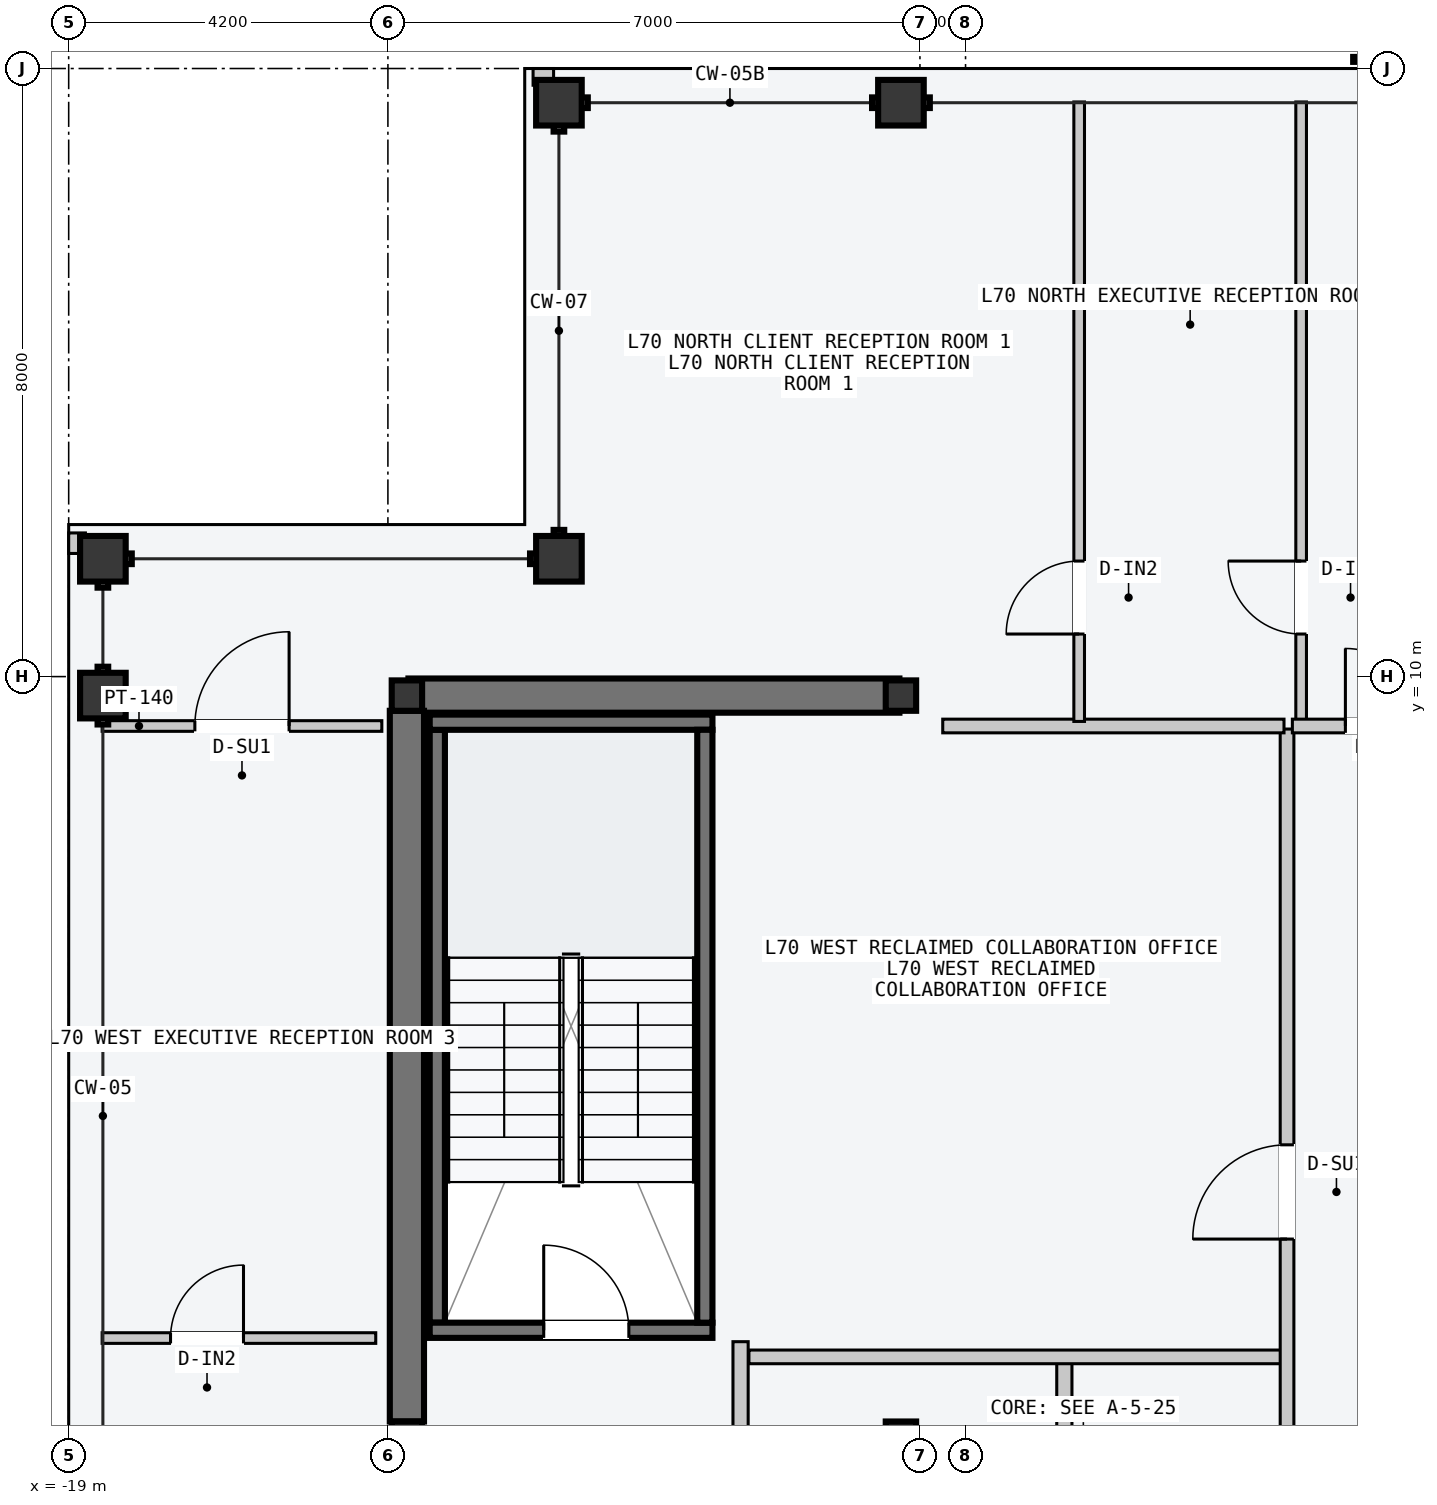
"""IFC4 building model, lengths in metres.
Left out: names, types, materials, properties, quantities, classifications, styles, units other than length and angle.
Written with IfcOpenShell. Run it as: python <this file> out.ifc"""

import sys

from ifc_helpers import new_model, si_unit, direction, frame, frame_2d, origin, origin_2d, place, context, subcontext, project, spatial, rectangle, hollow_rectangle, i_section, extrude, element, fill, save


model = new_model("IFC4")
c1 = context("Model", 3, precision=1e-05, world=origin(), true_north=direction((0.0, 1.0)))
c2 = subcontext(c1, "Body", "Model", "MODEL_VIEW")
j1 = project(units=[si_unit("LENGTHUNIT", "METRE"), si_unit("PLANEANGLEUNIT", "RADIAN")], contexts=[c1])
p1 = place(None, origin())
s1 = spatial("IfcSite", under=j1, at=p1, CompositionType="ELEMENT")
p2 = place(p1, origin())
s2 = spatial("IfcBuilding", under=s1, at=p2, CompositionType="ELEMENT")
p3 = place(p2, frame((0.0, 0.0, 265.2)))
s3 = spatial("IfcBuildingStorey", under=s2, at=p3, CompositionType="ELEMENT", Elevation=265.2)
p4 = place(p3, frame((-14.53, 9.75, -0.2), z_axis=(0.0, 0.0, 1.0), x_axis=(1.0, 0.0, 0.0)))
e1 = element("IfcWall", 1, at=p4, inside=s3, PredefinedType="SHEAR", context=c2, shape_type="SweptSolid", body=[
    extrude(rectangle(XDim=6.46, YDim=0.45, at=frame_2d((3.23, 0.0))), origin(), (0.0, 0.0, 1.0), 3.6),
])
p5 = place(p3, frame((-14.55, 0.2, -0.2), z_axis=(0.0, 0.0, 1.0), x_axis=(0.0, 1.0, 0.0)))
e2 = element("IfcWall", 2, at=p5, inside=s3, PredefinedType="SHEAR", context=c2, shape_type="SweptSolid", body=[
    extrude(rectangle(XDim=9.35, YDim=0.45, at=frame_2d((4.675, 0.0))), origin(), (0.0, 0.0, 1.0), 3.6),
])
p6 = place(p3, frame((-14.15, 1.5, -0.2), z_axis=(0.0, 0.0, 1.0), x_axis=(0.0, 1.0, 0.0)))
e3 = element("IfcWall", 3, at=p6, inside=s3, PredefinedType="SOLIDWALL", context=c2, shape_type="SweptSolid", body=[
    extrude(rectangle(XDim=7.8, YDim=0.2, at=frame_2d((3.9, 0.0))), origin(), (0.0, 0.0, 1.0), 3.6),
])
p7 = place(p3, frame((-14.25, 1.4, -0.2), z_axis=(0.0, 0.0, 1.0), x_axis=(1.0, 0.0, 0.0)))
e4 = element("IfcWall", 4, at=p7, inside=s3, PredefinedType="SOLIDWALL", context=c2, shape_type="SweptSolid", body=[
    extrude(rectangle(XDim=3.72, YDim=0.2, at=frame_2d((1.86, 0.0))), origin(), (0.0, 0.0, 1.0), 3.6),
])
p8 = place(p7, frame((1.5, 0.0, 0.2)))
e5 = element("IfcOpeningElement", 5, at=p8, cuts=e4, PredefinedType="OPENING", context=c2, shape_type="SweptSolid", body=[
    extrude(rectangle(XDim=1.12, YDim=2.18, at=frame_2d((0.56, 1.09))), frame((0.0, 0.11, 0.0), z_axis=(0.0, -1.0, 0.0), x_axis=(1.0, 0.0, 0.0)), (0.0, 0.0, 1.0), 0.22),
])
p9 = place(p3, frame((-14.25, 9.4, -0.2), z_axis=(0.0, 0.0, 1.0), x_axis=(1.0, 0.0, 0.0)))
e6 = element("IfcWall", 6, at=p9, inside=s3, PredefinedType="SOLIDWALL", context=c2, shape_type="SweptSolid", body=[
    extrude(rectangle(XDim=3.72, YDim=0.2, at=frame_2d((1.86, 0.0))), origin(), (0.0, 0.0, 1.0), 3.6),
])
p10 = place(p3, frame((-10.63, 1.5, -0.2), z_axis=(0.0, 0.0, 1.0), x_axis=(0.0, 1.0, 0.0)))
e7 = element("IfcWall", 7, at=p10, inside=s3, PredefinedType="SOLIDWALL", context=c2, shape_type="SweptSolid", body=[
    extrude(rectangle(XDim=7.8, YDim=0.2, at=frame_2d((3.9, 0.0))), origin(), (0.0, 0.0, 1.0), 3.6),
])
for number, where, z_axis, x_axis in (
    (8, (-14.55, 0.0, 0.0), (0.0, 0.0, 1.0), (1.0, 0.0, 0.0)),
    (9, (-14.55, 9.75, 0.0), (0.0, 0.0, 1.0), (1.0, 0.0, 0.0)),
    (10, (-8.05, 0.0, 0.0), (0.0, 0.0, 1.0), (1.0, 0.0, 0.0)),
    (11, (-8.05, 9.75, 0.0), (0.0, 0.0, 1.0), (1.0, 0.0, 0.0)),
):
    element("IfcColumn", number, at=place(p3, frame(where, z_axis=z_axis, x_axis=x_axis)), inside=s3, PredefinedType="COLUMN", context=c2, shape_type="SweptSolid", body=[
        extrude(i_section(OverallWidth=0.4, OverallDepth=0.4, WebThickness=0.013, FlangeThickness=0.021, at=origin_2d()), origin(), (0.0, 0.0, 1.0), 3.6),
    ])
for number, where, z_axis, x_axis in (
    (12, (-12.55, 17.55, 0.0), (0.0, 0.0, 1.0), (1.0, 0.0, 0.0)),
    (13, (-8.05, 17.55, 0.0), (0.0, 0.0, 1.0), (1.0, 0.0, 0.0)),
    (14, (-18.55, 9.75, 0.0), (0.0, 0.0, 1.0), (0.0, 1.0, 0.0)),
    (15, (-18.55, 11.55, 0.0), (0.0, 0.0, 1.0), (0.0, 1.0, 0.0)),
    (16, (-12.55, 11.55, 0.0), (0.0, 0.0, 1.0), (1.0, 0.0, 0.0)),
):
    element("IfcColumn", number, at=place(p3, frame(where, z_axis=z_axis, x_axis=x_axis)), inside=s3, PredefinedType="COLUMN", context=c2, shape_type="SweptSolid", body=[
        extrude(hollow_rectangle(XDim=0.6, YDim=0.6, WallThickness=0.025, at=origin_2d()), origin(), (0.0, 0.0, 1.0), 3.6),
    ])
for number, where, z_axis, x_axis in (
    (17, (-12.89, 17.89, 0.0), (0.0, 0.0, 1.0), (1.0, 0.0, 0.0)),
    (18, (-18.89, 11.62, 0.0), (0.0, 0.0, 1.0), (0.0, 1.0, 0.0)),
):
    element("IfcWall", number, at=place(p3, frame(where, z_axis=z_axis, x_axis=x_axis)), inside=s3, PredefinedType="PARAPET", context=c2, shape_type="SweptSolid", body=[
        extrude(rectangle(XDim=0.27, YDim=0.22, at=frame_2d((0.135, 0.0))), origin(), (0.0, 0.0, 1.0), 1.2),
    ])
p11 = place(p3, frame((-5.9, -9.45, 0.0), z_axis=(0.0, 0.0, 1.0), x_axis=(0.0, 1.0, 0.0)))
e19 = element("IfcWall", 19, at=p11, inside=s3, PredefinedType="PARTITIONING", context=c2, shape_type="SweptSolid", body=[
    extrude(rectangle(XDim=10.5, YDim=0.2, at=frame_2d((5.25, 0.0))), origin(), (0.0, 0.0, 1.0), 3.4),
])
p12 = place(p11, frame((3.9, 0.0, 0.0)))
e20 = element("IfcOpeningElement", 20, at=p12, cuts=e19, PredefinedType="OPENING", context=c2, shape_type="SweptSolid", body=[
    extrude(rectangle(XDim=1.5, YDim=2.2, at=frame_2d((0.75, 1.1))), frame((0.0, 0.11, 0.0), z_axis=(0.0, -1.0, 0.0), x_axis=(1.0, 0.0, 0.0)), (0.0, 0.0, 1.0), 0.22),
])
p13 = place(p3, frame((-10.16, -2.55, 0.0), z_axis=(0.0, 0.0, 1.0), x_axis=(0.0, 1.0, 0.0)))
e21 = element("IfcWall", 21, at=p13, inside=s3, PredefinedType="PARTITIONING", context=c2, shape_type="SweptSolid", body=[
    extrude(rectangle(XDim=3.8, YDim=0.2, at=frame_2d((1.9, 0.0))), origin(), (0.0, 0.0, 1.0), 3.4),
])
p14 = place(p13, frame((1.3, 0.0, 0.0)))
e22 = element("IfcOpeningElement", 22, at=p14, cuts=e21, PredefinedType="OPENING", context=c2, shape_type="SweptSolid", body=[
    extrude(rectangle(XDim=1.1, YDim=2.15, at=frame_2d((0.55, 1.075))), frame((0.0, 0.11, 0.0), z_axis=(0.0, -1.0, 0.0), x_axis=(1.0, 0.0, 0.0)), (0.0, 0.0, 1.0), 0.22),
])
p15 = place(p3, frame((-10.05, 1.05, 0.0), z_axis=(0.0, 0.0, 1.0), x_axis=(1.0, 0.0, 0.0)))
e23 = element("IfcWall", 23, at=p15, inside=s3, PredefinedType="PARTITIONING", context=c2, shape_type="SweptSolid", body=[
    extrude(rectangle(XDim=7.04, YDim=0.18, at=frame_2d((3.52, 0.0))), origin(), (0.0, 0.0, 1.0), 3.4),
])
p16 = place(p3, frame((-2.97, -3.5, 0.0), z_axis=(0.0, 0.0, 1.0), x_axis=(0.0, 1.0, 0.0)))
e24 = element("IfcWall", 24, at=p16, inside=s3, PredefinedType="PARTITIONING", context=c2, shape_type="SweptSolid", body=[
    extrude(rectangle(XDim=12.81, YDim=0.18, at=frame_2d((6.405, 0.0))), origin(), (0.0, 0.0, 1.0), 3.4),
])
p17 = place(p16, frame((6.1, 0.0, 0.0)))
e25 = element("IfcOpeningElement", 25, at=p17, cuts=e24, PredefinedType="OPENING", context=c2, shape_type="SweptSolid", body=[
    extrude(rectangle(XDim=1.24, YDim=2.24, at=frame_2d((0.62, 1.12))), frame((0.0, 0.1, 0.0), z_axis=(0.0, -1.0, 0.0), x_axis=(1.0, 0.0, 0.0)), (0.0, 0.0, 1.0), 0.2),
])
p18 = place(p16, frame((1.6, 0.0, 0.0)))
e26 = element("IfcOpeningElement", 26, at=p18, cuts=e24, PredefinedType="OPENING", context=c2, shape_type="SweptSolid", body=[
    extrude(rectangle(XDim=0.96, YDim=2.18, at=frame_2d((0.48, 1.09))), frame((0.0, 0.1, 0.0), z_axis=(0.0, -1.0, 0.0), x_axis=(1.0, 0.0, 0.0)), (0.0, 0.0, 1.0), 0.2),
])
p19 = place(p3, frame((-7.5, 9.35, 0.0), z_axis=(0.0, 0.0, 1.0), x_axis=(1.0, 0.0, 0.0)))
e27 = element("IfcWall", 27, at=p19, inside=s3, PredefinedType="PARTITIONING", context=c2, shape_type="SweptSolid", body=[
    extrude(rectangle(XDim=4.49, YDim=0.18, at=frame_2d((2.245, 0.0))), origin(), (0.0, 0.0, 1.0), 3.4),
])
p20 = place(p3, frame((-5.705, 9.41, 0.0), z_axis=(0.0, 0.0, 1.0), x_axis=(0.0, 1.0, 0.0)))
e28 = element("IfcWall", 28, at=p20, inside=s3, PredefinedType="PARTITIONING", context=c2, shape_type="SweptSolid", body=[
    extrude(rectangle(XDim=8.15, YDim=0.14, at=frame_2d((4.075, 0.0))), origin(), (0.0, 0.0, 1.0), 3.4),
])
p21 = place(p20, frame((1.15, 0.0, 0.0)))
e29 = element("IfcOpeningElement", 29, at=p21, cuts=e28, PredefinedType="OPENING", context=c2, shape_type="SweptSolid", body=[
    extrude(rectangle(XDim=0.96, YDim=2.18, at=frame_2d((0.48, 1.09))), frame((0.0, 0.08, 0.0), z_axis=(0.0, -1.0, 0.0), x_axis=(1.0, 0.0, 0.0)), (0.0, 0.0, 1.0), 0.16),
])
p22 = place(p3, frame((-2.785, 9.41, 0.0), z_axis=(0.0, 0.0, 1.0), x_axis=(0.0, 1.0, 0.0)))
e30 = element("IfcWall", 30, at=p22, inside=s3, PredefinedType="PARTITIONING", context=c2, shape_type="SweptSolid", body=[
    extrude(rectangle(XDim=8.15, YDim=0.14, at=frame_2d((4.075, 0.0))), origin(), (0.0, 0.0, 1.0), 3.4),
])
p23 = place(p22, frame((1.15, 0.0, 0.0)))
e31 = element("IfcOpeningElement", 31, at=p23, cuts=e30, PredefinedType="OPENING", context=c2, shape_type="SweptSolid", body=[
    extrude(rectangle(XDim=0.96, YDim=2.18, at=frame_2d((0.48, 1.09))), frame((0.0, 0.08, 0.0), z_axis=(0.0, -1.0, 0.0), x_axis=(1.0, 0.0, 0.0)), (0.0, 0.0, 1.0), 0.16),
])
p24 = place(p3, frame((-2.9, 9.35, 0.0), z_axis=(0.0, 0.0, 1.0), x_axis=(1.0, 0.0, 0.0)))
e32 = element("IfcWall", 32, at=p24, inside=s3, PredefinedType="PARTITIONING", context=c2, shape_type="SweptSolid", body=[
    extrude(rectangle(XDim=2.3, YDim=0.18, at=frame_2d((1.15, 0.0))), origin(), (0.0, 0.0, 1.0), 3.4),
])
p25 = place(p24, frame((0.698, 0.0, 0.0)))
e33 = element("IfcOpeningElement", 33, at=p25, cuts=e32, PredefinedType="OPENING", context=c2, shape_type="SweptSolid", body=[
    extrude(rectangle(XDim=1.02, YDim=2.2, at=frame_2d((0.51, 1.1))), frame((0.0, 0.1, 0.0), z_axis=(0.0, -1.0, 0.0), x_axis=(1.0, 0.0, 0.0)), (0.0, 0.0, 1.0), 0.2),
])
p26 = place(p3, frame((-18.56, 9.35, 0.0), z_axis=(0.0, 0.0, 1.0), x_axis=(1.0, 0.0, 0.0)))
e34 = element("IfcWall", 34, at=p26, inside=s3, PredefinedType="PARTITIONING", context=c2, shape_type="SweptSolid", body=[
    extrude(rectangle(XDim=3.68, YDim=0.14, at=frame_2d((1.84, 0.0))), origin(), (0.0, 0.0, 1.0), 3.4),
])
p27 = place(p26, frame((1.22, 0.0, 0.0)))
e35 = element("IfcOpeningElement", 35, at=p27, cuts=e34, PredefinedType="OPENING", context=c2, shape_type="SweptSolid", body=[
    extrude(rectangle(XDim=1.24, YDim=2.24, at=frame_2d((0.62, 1.12))), frame((0.0, 0.08, 0.0), z_axis=(0.0, -1.0, 0.0), x_axis=(1.0, 0.0, 0.0)), (0.0, 0.0, 1.0), 0.16),
])
p28 = place(p3, frame((-18.56, 1.298, 0.0), z_axis=(0.0, 0.0, 1.0), x_axis=(1.0, 0.0, 0.0)))
e36 = element("IfcWall", 36, at=p28, inside=s3, PredefinedType="PARTITIONING", context=c2, shape_type="SweptSolid", body=[
    extrude(rectangle(XDim=3.6, YDim=0.14, at=frame_2d((1.8, 0.0))), origin(), (0.0, 0.0, 1.0), 3.4),
])
p29 = place(p28, frame((0.9, 0.0, 0.0)))
e37 = element("IfcOpeningElement", 37, at=p29, cuts=e36, PredefinedType="OPENING", context=c2, shape_type="SweptSolid", body=[
    extrude(rectangle(XDim=0.96, YDim=2.18, at=frame_2d((0.48, 1.09))), frame((0.0, 0.08, 0.0), z_axis=(0.0, -1.0, 0.0), x_axis=(1.0, 0.0, 0.0)), (0.0, 0.0, 1.0), 0.16),
])
p30 = place(p8, origin())
e38 = element("IfcDoor", 38, at=p30, inside=s3, OperationType="SINGLE_SWING_LEFT", PredefinedType="DOOR", context=c2, shape_type="SweptSolid", body=[
    extrude(rectangle(XDim=1.12, YDim=2.18, at=frame_2d((0.56, 1.09))), frame((0.0, 0.025, 0.0), z_axis=(0.0, -1.0, 0.0), x_axis=(1.0, 0.0, 0.0)), (0.0, 0.0, 1.0), 0.05),
])
fill(e5, e38)
p31 = place(p17, origin())
e39 = element("IfcDoor", 39, at=p31, inside=s3, OperationType="SINGLE_SWING_LEFT", PredefinedType="DOOR", context=c2, shape_type="SweptSolid", body=[
    extrude(rectangle(XDim=1.24, YDim=2.24, at=frame_2d((0.62, 1.12))), frame((0.0, 0.025, 0.0), z_axis=(0.0, -1.0, 0.0), x_axis=(1.0, 0.0, 0.0)), (0.0, 0.0, 1.0), 0.05),
])
fill(e25, e39)
p32 = place(p21, origin())
e40 = element("IfcDoor", 40, at=p32, inside=s3, OperationType="SINGLE_SWING_LEFT", PredefinedType="DOOR", context=c2, shape_type="SweptSolid", body=[
    extrude(rectangle(XDim=0.96, YDim=2.18, at=frame_2d((0.48, 1.09))), frame((0.0, 0.025, 0.0), z_axis=(0.0, -1.0, 0.0), x_axis=(1.0, 0.0, 0.0)), (0.0, 0.0, 1.0), 0.05),
])
fill(e29, e40)
p33 = place(p23, origin())
e41 = element("IfcDoor", 41, at=p33, inside=s3, OperationType="SINGLE_SWING_RIGHT", PredefinedType="DOOR", context=c2, shape_type="SweptSolid", body=[
    extrude(rectangle(XDim=0.96, YDim=2.18, at=frame_2d((0.48, 1.09))), frame((0.0, 0.025, 0.0), z_axis=(0.0, -1.0, 0.0), x_axis=(1.0, 0.0, 0.0)), (0.0, 0.0, 1.0), 0.05),
])
fill(e31, e41)
p34 = place(p25, origin())
e42 = element("IfcDoor", 42, at=p34, inside=s3, OperationType="SINGLE_SWING_LEFT", PredefinedType="DOOR", context=c2, shape_type="SweptSolid", body=[
    extrude(rectangle(XDim=1.02, YDim=2.2, at=frame_2d((0.51, 1.1))), frame((0.0, 0.025, 0.0), z_axis=(0.0, -1.0, 0.0), x_axis=(1.0, 0.0, 0.0)), (0.0, 0.0, 1.0), 0.05),
])
fill(e33, e42)
p35 = place(p27, origin())
e43 = element("IfcDoor", 43, at=p35, inside=s3, OperationType="SINGLE_SWING_RIGHT", PredefinedType="DOOR", context=c2, shape_type="SweptSolid", body=[
    extrude(rectangle(XDim=1.24, YDim=2.24, at=frame_2d((0.62, 1.12))), frame((0.0, 0.025, 0.0), z_axis=(0.0, -1.0, 0.0), x_axis=(1.0, 0.0, 0.0)), (0.0, 0.0, 1.0), 0.05),
])
fill(e35, e43)
p36 = place(p29, origin())
e44 = element("IfcDoor", 44, at=p36, inside=s3, OperationType="SINGLE_SWING_RIGHT", PredefinedType="DOOR", context=c2, shape_type="SweptSolid", body=[
    extrude(rectangle(XDim=0.96, YDim=2.18, at=frame_2d((0.48, 1.09))), frame((0.0, 0.025, 0.0), z_axis=(0.0, -1.0, 0.0), x_axis=(1.0, 0.0, 0.0)), (0.0, 0.0, 1.0), 0.05),
])
fill(e37, e44)
save(model, sys.argv[1])
